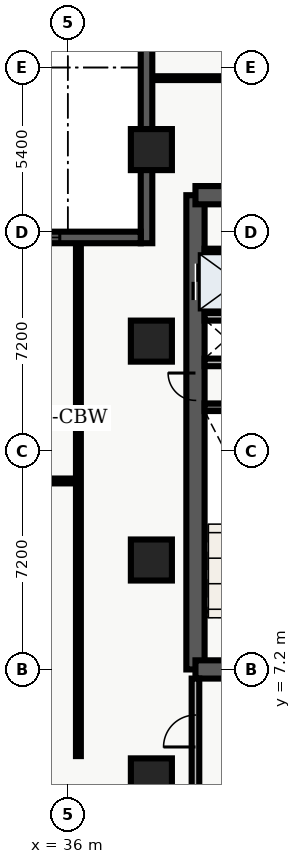
"""IFC4 building model, lengths in metres.
Left out: names, types, materials, properties, quantities, classifications, styles, units other than length and angle.
Written with IfcOpenShell. Run it as: python <this file> out.ifc"""

import sys

from ifc_helpers import new_model, entity, si_unit, converted_unit, direction, frame, origin_with_axes, origin_2d_with_axis, place, context, subcontext, project, spatial, polyline, rectangle, outline, extrude, element, fill, save


model = new_model("IFC4")
c1 = context("Model", 3, precision=1e-05, world=origin_with_axes(), true_north=direction((0.0, 1.0)))
c2 = subcontext(c1, "Body", "Model", "MODEL_VIEW")
j1 = project(units=[si_unit("LENGTHUNIT", "METRE"), converted_unit("PLANEANGLEUNIT", "DEGREE", entity("IfcPlaneAngleMeasure", 0.017), si_unit("PLANEANGLEUNIT", "RADIAN"), dimensions=[0, 0, 0, 0, 0, 0, 0])], contexts=[c1])
p1 = place(None, origin_with_axes())
s1 = spatial("IfcSite", under=j1, at=p1, CompositionType="ELEMENT")
p2 = place(p1, origin_with_axes())
s2 = spatial("IfcBuilding", under=s1, at=p2, CompositionType="ELEMENT")
p3 = place(p2, frame((0.0, 0.0, 60.0), z_axis=(0.0, 0.0, 1.0), x_axis=(1.0, 0.0, 0.0)))
s3 = spatial("IfcBuildingStorey", under=s2, at=p3, CompositionType="ELEMENT", Elevation=60.0)
p4 = place(p3, frame((40.2, 7.2, 0.0), z_axis=(0.0, 0.0, 1.0), x_axis=(0.0, 1.0, 0.0)))
e1 = element("IfcWall", 1, at=p4, inside=s3, PredefinedType="SHEAR", context=c2, shape_type="SweptSolid", body=[
    extrude(outline(polyline([(0.0, -0.3), (15.6, -0.3), (15.6, 0.3), (0.0, 0.3), (0.0, -0.3)])), origin_with_axes(), (0.0, 0.0, 1.0), 3.66),
])
p5 = place(p4, frame((12.75, 0.0, 0.0), z_axis=(0.0, 0.0, 1.0), x_axis=(1.0, 0.0, 0.0)))
e2 = element("IfcOpeningElement", 2, at=p5, cuts=e1, PredefinedType="OPENING", context=c2, shape_type="SweptSolid", body=[
    extrude(rectangle(XDim=1.2, YDim=0.62, at=origin_2d_with_axis()), origin_with_axes(), (0.0, 0.0, 1.0), 2.15),
])
p6 = place(p4, frame((9.3, 0.0, 0.0), z_axis=(0.0, 0.0, 1.0), x_axis=(1.0, 0.0, 0.0)))
e3 = element("IfcOpeningElement", 3, at=p6, cuts=e1, PredefinedType="OPENING", context=c2, shape_type="SweptSolid", body=[
    extrude(rectangle(XDim=0.9, YDim=0.62, at=origin_2d_with_axis()), origin_with_axes(), (0.0, 0.0, 1.0), 2.15),
])
p7 = place(p3, frame((40.2, 7.2, 0.0), z_axis=(0.0, 0.0, 1.0), x_axis=(1.0, 0.0, 0.0)))
e4 = element("IfcWall", 4, at=p7, inside=s3, PredefinedType="SHEAR", context=c2, shape_type="SweptSolid", body=[
    extrude(outline(polyline([(0.0, -0.3), (7.85, -0.3), (7.85, 0.3), (0.0, 0.3), (0.0, -0.3)])), origin_with_axes(), (0.0, 0.0, 1.0), 3.66),
])
p8 = place(p7, frame((2.175, 0.0, 0.0), z_axis=(0.0, 0.0, 1.0), x_axis=(1.0, 0.0, 0.0)))
e5 = element("IfcOpeningElement", 5, at=p8, cuts=e4, PredefinedType="OPENING", context=c2, shape_type="SweptSolid", body=[
    extrude(rectangle(XDim=1.05, YDim=0.62, at=origin_2d_with_axis()), origin_with_axes(), (0.0, 0.0, 1.0), 2.15),
])
p9 = place(p3, frame((40.2, 22.8, 0.0), z_axis=(0.0, 0.0, 1.0), x_axis=(1.0, 0.0, 0.0)))
e6 = element("IfcWall", 6, at=p9, inside=s3, PredefinedType="SHEAR", context=c2, shape_type="SweptSolid", body=[
    extrude(outline(polyline([(0.0, -0.3), (7.85, -0.3), (7.85, 0.3), (0.0, 0.3), (0.0, -0.3)])), origin_with_axes(), (0.0, 0.0, 1.0), 3.66),
])
p10 = place(p9, frame((5.775, 0.0, 0.0), z_axis=(0.0, 0.0, 1.0), x_axis=(1.0, 0.0, 0.0)))
e7 = element("IfcOpeningElement", 7, at=p10, cuts=e6, PredefinedType="OPENING", context=c2, shape_type="SweptSolid", body=[
    extrude(rectangle(XDim=1.05, YDim=0.62, at=origin_2d_with_axis()), origin_with_axes(), (0.0, 0.0, 1.0), 2.15),
])
p11 = place(p9, frame((2.15, 0.0, 0.0), z_axis=(0.0, 0.0, 1.0), x_axis=(1.0, 0.0, 0.0)))
e8 = element("IfcOpeningElement", 8, at=p11, cuts=e6, PredefinedType="OPENING", context=c2, shape_type="SweptSolid", body=[
    extrude(rectangle(XDim=0.9, YDim=0.62, at=origin_2d_with_axis()), origin_with_axes(), (0.0, 0.0, 1.0), 2.15),
])
p12 = place(p3, frame((40.5, 15.825, 0.0), z_axis=(0.0, 0.0, 1.0), x_axis=(1.0, 0.0, 0.0)))
e9 = element("IfcWall", 9, at=p12, inside=s3, PredefinedType="SHEAR", context=c2, shape_type="SweptSolid", body=[
    extrude(outline(polyline([(0.0, -0.125), (3.5, -0.125), (3.5, 0.125), (0.0, 0.125), (0.0, -0.125)])), origin_with_axes(), (0.0, 0.0, 1.0), 3.66),
])
p13 = place(p3, frame((40.5, 17.3, 0.0), z_axis=(0.0, 0.0, 1.0), x_axis=(1.0, 0.0, 0.0)))
e10 = element("IfcWall", 10, at=p13, inside=s3, PredefinedType="SOLIDWALL", context=c2, shape_type="SweptSolid", body=[
    extrude(outline(polyline([(0.0, -0.125), (3.5, -0.125), (3.5, 0.125), (0.0, 0.125), (0.0, -0.125)])), origin_with_axes(), (0.0, 0.0, 1.0), 2.7),
])
p14 = place(p13, frame((2.4, 0.0, 0.0), z_axis=(0.0, 0.0, 1.0), x_axis=(1.0, 0.0, 0.0)))
e11 = element("IfcOpeningElement", 11, at=p14, cuts=e10, PredefinedType="OPENING", context=c2, shape_type="SweptSolid", body=[
    extrude(rectangle(XDim=0.9, YDim=0.27, at=origin_2d_with_axis()), origin_with_axes(), (0.0, 0.0, 1.0), 2.15),
])
p15 = place(p3, frame((40.5, 18.8, 0.0), z_axis=(0.0, 0.0, 1.0), x_axis=(1.0, 0.0, 0.0)))
e12 = element("IfcWall", 12, at=p15, inside=s3, PredefinedType="SOLIDWALL", context=c2, shape_type="SweptSolid", body=[
    extrude(outline(polyline([(0.0, -0.125), (3.5, -0.125), (3.5, 0.125), (0.0, 0.125), (0.0, -0.125)])), origin_with_axes(), (0.0, 0.0, 1.0), 2.7),
])
p16 = place(p3, frame((40.2, 3.1, 0.0), z_axis=(0.0, 0.0, 1.0), x_axis=(0.0, 1.0, 0.0)))
e13 = element("IfcWall", 13, at=p16, inside=s3, PredefinedType="SOLIDWALL", context=c2, shape_type="SweptSolid", body=[
    extrude(outline(polyline([(0.0, -0.125), (3.8, -0.125), (3.8, 0.125), (0.0, 0.125), (0.0, -0.125)])), origin_with_axes(), (0.0, 0.0, 1.0), 2.7),
])
p17 = place(p16, frame((2.075, 0.0, 0.0), z_axis=(0.0, 0.0, 1.0), x_axis=(1.0, 0.0, 0.0)))
e14 = element("IfcOpeningElement", 14, at=p17, cuts=e13, PredefinedType="OPENING", context=c2, shape_type="SweptSolid", body=[
    extrude(rectangle(XDim=1.05, YDim=0.27, at=origin_2d_with_axis()), origin_with_axes(), (0.0, 0.0, 1.0), 2.15),
])
for number, where, z_axis, x_axis in (
    (15, (38.75, 3.6, 0.0), (0.0, 0.0, 1.0), (1.0, 0.0, 0.0)),
    (16, (38.75, 10.8, 0.0), (0.0, 0.0, 1.0), (1.0, 0.0, 0.0)),
    (17, (38.75, 18.0, 0.0), (0.0, 0.0, 1.0), (1.0, 0.0, 0.0)),
    (18, (38.75, 24.3, 0.0), (0.0, 0.0, 1.0), (1.0, 0.0, 0.0)),
):
    element("IfcColumn", number, at=place(p3, frame(where, z_axis=z_axis, x_axis=x_axis)), inside=s3, PredefinedType="COLUMN", context=c2, shape_type="SweptSolid", body=[
        extrude(rectangle(XDim=1.35, YDim=1.35, at=origin_2d_with_axis()), origin_with_axes(), (0.0, 0.0, 1.0), 3.9),
    ])
p18 = place(p3, frame((40.5, 20.96, 0.0), z_axis=(0.0, 0.0, 1.0), x_axis=(1.0, 0.0, 0.0)))
e19 = element("IfcWall", 19, at=p18, inside=s3, PredefinedType="PARTITIONING", context=c2, shape_type="SweptSolid", body=[
    extrude(outline(polyline([(0.0, -0.08), (3.5, -0.08), (3.5, 0.08), (0.0, 0.08), (0.0, -0.08)])), origin_with_axes(), (0.0, 0.0, 1.0), 2.7),
])
p19 = place(p3, frame((21.15, 13.4, 0.0), z_axis=(0.0, 0.0, 1.0), x_axis=(1.0, 0.0, 0.0)))
e20 = element("IfcWall", 20, at=p19, inside=s3, PredefinedType="PARTITIONING", context=c2, shape_type="SweptSolid", body=[
    extrude(outline(polyline([(0.0, -0.08), (15.2, -0.08), (15.2, 0.08), (0.0, 0.08), (0.0, -0.08)])), origin_with_axes(), (0.0, 0.0, 1.0), 2.7),
])
p20 = place(p19, frame((2.829, 0.0, 0.0), z_axis=(0.0, 0.0, 1.0), x_axis=(1.0, 0.0, 0.0)))
e21 = element("IfcOpeningElement", 21, at=p20, cuts=e20, PredefinedType="OPENING", context=c2, shape_type="SweptSolid", body=[
    extrude(rectangle(XDim=1.0, YDim=0.18, at=origin_2d_with_axis()), origin_with_axes(), (0.0, 0.0, 1.0), 2.15),
])
p21 = place(p19, frame((8.536, 0.0, 0.0), z_axis=(0.0, 0.0, 1.0), x_axis=(1.0, 0.0, 0.0)))
e22 = element("IfcOpeningElement", 22, at=p21, cuts=e20, PredefinedType="OPENING", context=c2, shape_type="SweptSolid", body=[
    extrude(rectangle(XDim=1.2, YDim=0.18, at=origin_2d_with_axis()), origin_with_axes(), (0.0, 0.0, 1.0), 2.2),
])
p22 = place(p19, frame((13.076, 0.0, 0.0), z_axis=(0.0, 0.0, 1.0), x_axis=(1.0, 0.0, 0.0)))
e23 = element("IfcOpeningElement", 23, at=p22, cuts=e20, PredefinedType="OPENING", context=c2, shape_type="SweptSolid", body=[
    extrude(rectangle(XDim=1.0, YDim=0.18, at=origin_2d_with_axis()), origin_with_axes(), (0.0, 0.0, 1.0), 2.15),
])
p23 = place(p3, frame((21.15, 15.7, 0.0), z_axis=(0.0, 0.0, 1.0), x_axis=(1.0, 0.0, 0.0)))
e24 = element("IfcWall", 24, at=p23, inside=s3, PredefinedType="PARTITIONING", context=c2, shape_type="SweptSolid", body=[
    extrude(outline(polyline([(0.0, -0.08), (15.2, -0.08), (15.2, 0.08), (0.0, 0.08), (0.0, -0.08)])), origin_with_axes(), (0.0, 0.0, 1.0), 2.7),
])
p24 = place(p23, frame((3.468, 0.0, 0.0), z_axis=(0.0, 0.0, 1.0), x_axis=(1.0, 0.0, 0.0)))
e25 = element("IfcOpeningElement", 25, at=p24, cuts=e24, PredefinedType="OPENING", context=c2, shape_type="SweptSolid", body=[
    extrude(rectangle(XDim=1.0, YDim=0.18, at=origin_2d_with_axis()), origin_with_axes(), (0.0, 0.0, 1.0), 2.15),
])
p25 = place(p23, frame((10.938, 0.0, 0.0), z_axis=(0.0, 0.0, 1.0), x_axis=(1.0, 0.0, 0.0)))
e26 = element("IfcOpeningElement", 26, at=p25, cuts=e24, PredefinedType="OPENING", context=c2, shape_type="SweptSolid", body=[
    extrude(rectangle(XDim=1.0, YDim=0.18, at=origin_2d_with_axis()), origin_with_axes(), (0.0, 0.0, 1.0), 2.15),
])
p26 = place(p3, frame((36.35, 4.35, 0.0), z_axis=(0.0, 0.0, 1.0), x_axis=(0.0, 1.0, 0.0)))
e27 = element("IfcWall", 27, at=p26, inside=s3, PredefinedType="PARTITIONING", context=c2, shape_type="SweptSolid", body=[
    extrude(outline(polyline([(0.0, -0.08), (16.95, -0.08), (16.95, 0.08), (0.0, 0.08), (0.0, -0.08)])), origin_with_axes(), (0.0, 0.0, 1.0), 2.7),
])
p27 = place(p3, frame((38.76, 26.65, 0.0), z_axis=(0.0, 0.0, 1.0), x_axis=(1.0, 0.0, 0.0)))
e28 = element("IfcWall", 28, at=p27, inside=s3, PredefinedType="PARTITIONING", context=c2, shape_type="SweptSolid", body=[
    extrude(outline(polyline([(0.0, -0.062), (20.88, -0.062), (20.88, 0.062), (0.0, 0.062), (0.0, -0.062)])), origin_with_axes(), (0.0, 0.0, 1.0), 2.7),
])
p28 = place(p27, frame((4.24, 0.0, 0.0), z_axis=(0.0, 0.0, 1.0), x_axis=(1.0, 0.0, 0.0)))
e29 = element("IfcOpeningElement", 29, at=p28, cuts=e28, PredefinedType="OPENING", context=c2, shape_type="SweptSolid", body=[
    extrude(rectangle(XDim=1.0, YDim=0.145, at=origin_2d_with_axis()), origin_with_axes(), (0.0, 0.0, 1.0), 2.15),
])
p29 = place(p3, frame((38.59, 21.22, 0.0), z_axis=(0.0, 0.0, 1.0), x_axis=(0.0, 1.0, 0.0)))
e30 = element("IfcWall", 30, at=p29, inside=s3, PredefinedType="SOLIDWALL", context=c2, shape_type="SweptSolid", body=[
    extrude(outline(polyline([(0.0, -0.19), (7.58, -0.19), (7.58, 0.19), (0.0, 0.19), (0.0, -0.19)])), origin_with_axes(), (0.0, 0.0, 1.0), 3.66),
])
p30 = place(p3, frame((21.22, 21.41, 0.0), z_axis=(0.0, 0.0, 1.0), x_axis=(1.0, 0.0, 0.0)))
e31 = element("IfcWall", 31, at=p30, inside=s3, PredefinedType="SOLIDWALL", context=c2, shape_type="SweptSolid", body=[
    extrude(outline(polyline([(0.0, -0.19), (17.18, -0.19), (17.18, 0.19), (0.0, 0.19), (0.0, -0.19)])), origin_with_axes(), (0.0, 0.0, 1.0), 3.66),
])
p31 = place(p30, frame((3.263, 0.0, 0.45), z_axis=(0.0, 0.0, 1.0), x_axis=(1.0, 0.0, 0.0)))
e32 = element("IfcOpeningElement", 32, at=p31, cuts=e31, PredefinedType="OPENING", context=c2, shape_type="SweptSolid", body=[
    extrude(rectangle(XDim=2.1, YDim=0.4, at=origin_2d_with_axis()), origin_with_axes(), (0.0, 0.0, 1.0), 2.2),
])
p32 = place(p30, frame((8.59, 0.0, 0.45), z_axis=(0.0, 0.0, 1.0), x_axis=(1.0, 0.0, 0.0)))
e33 = element("IfcOpeningElement", 33, at=p32, cuts=e31, PredefinedType="OPENING", context=c2, shape_type="SweptSolid", body=[
    extrude(rectangle(XDim=2.1, YDim=0.4, at=origin_2d_with_axis()), origin_with_axes(), (0.0, 0.0, 1.0), 2.2),
])
p33 = place(p30, frame((13.467, 0.0, 0.45), z_axis=(0.0, 0.0, 1.0), x_axis=(1.0, 0.0, 0.0)))
e34 = element("IfcOpeningElement", 34, at=p33, cuts=e31, PredefinedType="OPENING", context=c2, shape_type="SweptSolid", body=[
    extrude(rectangle(XDim=2.1, YDim=0.4, at=origin_2d_with_axis()), origin_with_axes(), (0.0, 0.0, 1.0), 2.2),
])
p34 = place(p4, frame((12.75, 0.0, 0.0), z_axis=(0.0, 0.0, 1.0), x_axis=(1.0, 0.0, 0.0)))
e35 = element("IfcDoor", 35, at=p34, inside=s3, OperationType="DOUBLE_DOOR_SLIDING", PredefinedType="DOOR", context=c2, shape_type="SweptSolid", body=[
    extrude(rectangle(XDim=1.2, YDim=0.09, at=origin_2d_with_axis()), origin_with_axes(), (0.0, 0.0, 1.0), 2.15),
])
fill(e2, e35)
p35 = place(p4, frame((9.3, 0.0, 0.0), z_axis=(0.0, 0.0, 1.0), x_axis=(1.0, 0.0, 0.0)))
e36 = element("IfcDoor", 36, at=p35, inside=s3, OperationType="SINGLE_SWING_RIGHT", PredefinedType="DOOR", context=c2, shape_type="SweptSolid", body=[
    extrude(rectangle(XDim=0.9, YDim=0.09, at=origin_2d_with_axis()), origin_with_axes(), (0.0, 0.0, 1.0), 2.15),
])
fill(e3, e36)
p36 = place(p16, frame((2.075, 0.0, 0.0), z_axis=(0.0, 0.0, 1.0), x_axis=(1.0, 0.0, 0.0)))
e37 = element("IfcDoor", 37, at=p36, inside=s3, OperationType="SINGLE_SWING_LEFT", PredefinedType="DOOR", context=c2, shape_type="SweptSolid", body=[
    extrude(rectangle(XDim=1.05, YDim=0.09, at=origin_2d_with_axis()), origin_with_axes(), (0.0, 0.0, 1.0), 2.15),
])
fill(e14, e37)
p37 = place(p30, frame((13.467, 0.0, 0.45), z_axis=(0.0, 0.0, 1.0), x_axis=(1.0, 0.0, 0.0)))
e38 = element("IfcWindow", 38, at=p37, inside=s3, PredefinedType="WINDOW", context=c2, shape_type="SweptSolid", body=[
    extrude(rectangle(XDim=2.1, YDim=0.09, at=origin_2d_with_axis()), origin_with_axes(), (0.0, 0.0, 1.0), 2.2),
])
fill(e34, e38)
save(model, sys.argv[1])
